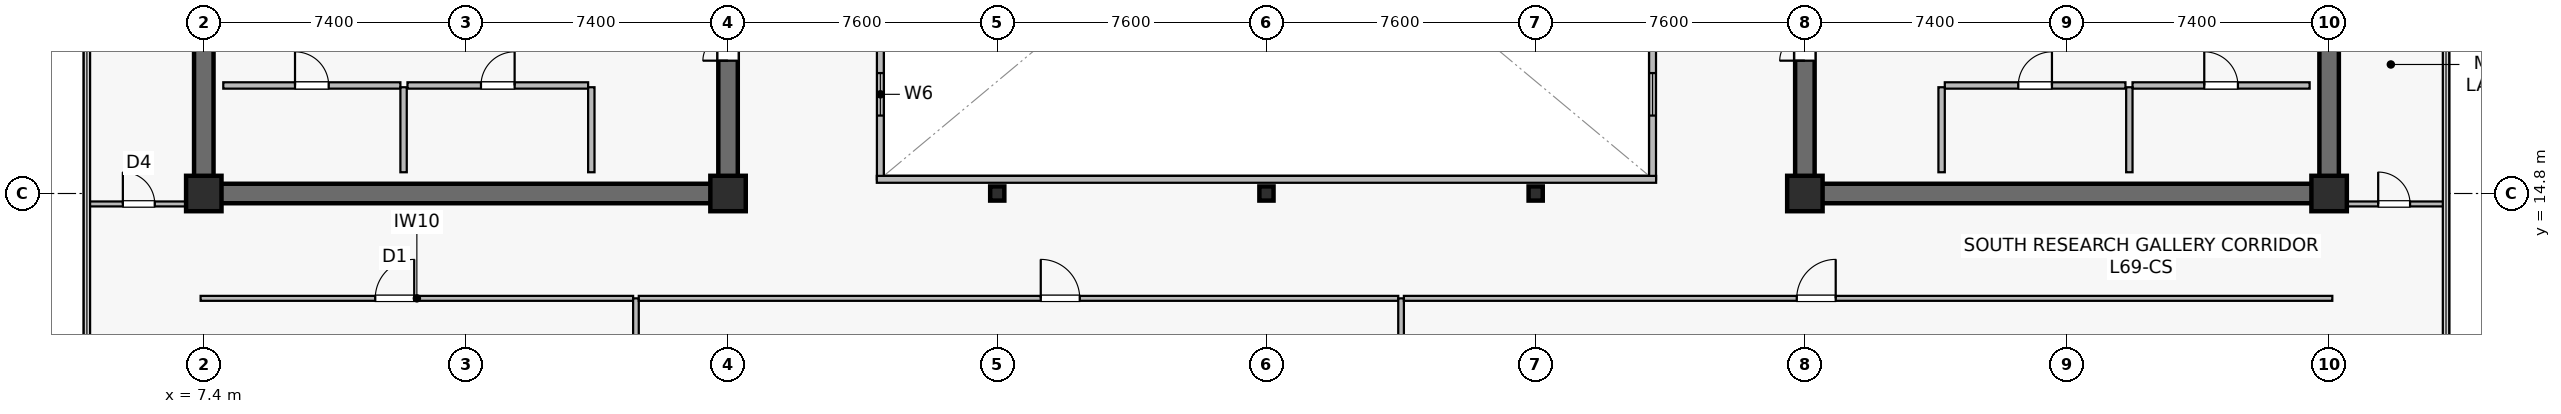
"""IFC4 building model, lengths in metres.
Left out: names, types, materials, properties, quantities, classifications, styles, units other than length and angle.
Written with IfcOpenShell. Run it as: python <this file> out.ifc"""

import sys

from ifc_helpers import new_model, si_unit, direction, frame, frame_2d, origin, origin_2d, place, context, subcontext, project, spatial, rectangle, hollow_rectangle, extrude, source, transform, mapped, element, fill, save


model = new_model("IFC4")
c1 = context("Model", 3, precision=1e-05, world=origin(), true_north=direction((0.0, 1.0)))
c2 = subcontext(c1, "Body", "Model", "MODEL_VIEW")
j1 = project(units=[si_unit("LENGTHUNIT", "METRE"), si_unit("PLANEANGLEUNIT", "RADIAN")], contexts=[c1])
p1 = place(None, origin())
s1 = spatial("IfcSite", under=j1, at=p1, CompositionType="ELEMENT")
p2 = place(p1, origin())
s2 = spatial("IfcBuilding", under=s1, at=p2, CompositionType="ELEMENT")
p3 = place(p2, frame((0.0, 0.0, 287.5)))
s3 = spatial("IfcBuildingStorey", under=s2, at=p3, CompositionType="ELEMENT", Elevation=287.5)
p4 = place(p3, frame((7.125, 14.8, 0.0), z_axis=(0.0, 0.0, 1.0), x_axis=(1.0, 0.0, 0.0)))
e1 = element("IfcWall", 1, at=p4, inside=s3, PredefinedType="SHEAR", context=c2, shape_type="SweptSolid", body=[
    extrude(rectangle(XDim=15.35, YDim=0.55, at=frame_2d((7.675, 0.0))), origin(), (0.0, 0.0, 1.0), 3.8),
])
p5 = place(p3, frame((7.4, 15.075, 0.0), z_axis=(0.0, 0.0, 1.0), x_axis=(0.0, 1.0, 0.0)))
e2 = element("IfcWall", 2, at=p5, inside=s3, PredefinedType="SHEAR", context=c2, shape_type="SweptSolid", body=[
    extrude(rectangle(XDim=18.45, YDim=0.55, at=frame_2d((9.225, 0.0))), origin(), (0.0, 0.0, 1.0), 3.8),
])
p6 = place(p3, frame((22.2, 15.075, 0.0), z_axis=(0.0, 0.0, 1.0), x_axis=(0.0, 1.0, 0.0)))
e3 = element("IfcWall", 3, at=p6, inside=s3, PredefinedType="SHEAR", context=c2, shape_type="SweptSolid", body=[
    extrude(rectangle(XDim=18.45, YDim=0.55, at=frame_2d((9.225, 0.0))), origin(), (0.0, 0.0, 1.0), 3.8),
])
p7 = place(p6, frame((3.475, 0.0, 0.0)))
e4 = element("IfcOpeningElement", 4, at=p7, cuts=e3, PredefinedType="OPENING", context=c2, shape_type="SweptSolid", body=[
    extrude(rectangle(XDim=1.42, YDim=2.2, at=frame_2d((0.71, 1.1))), frame((0.0, 0.285, 0.0), z_axis=(0.0, -1.0, 0.0), x_axis=(1.0, 0.0, 0.0)), (0.0, 0.0, 1.0), 0.57),
])
p8 = place(p3, frame((52.325, 14.8, 0.0), z_axis=(0.0, 0.0, 1.0), x_axis=(1.0, 0.0, 0.0)))
e5 = element("IfcWall", 5, at=p8, inside=s3, PredefinedType="SHEAR", context=c2, shape_type="SweptSolid", body=[
    extrude(rectangle(XDim=15.35, YDim=0.55, at=frame_2d((7.675, 0.0))), origin(), (0.0, 0.0, 1.0), 3.8),
])
p9 = place(p3, frame((52.6, 15.075, 0.0), z_axis=(0.0, 0.0, 1.0), x_axis=(0.0, 1.0, 0.0)))
e6 = element("IfcWall", 6, at=p9, inside=s3, PredefinedType="SHEAR", context=c2, shape_type="SweptSolid", body=[
    extrude(rectangle(XDim=18.45, YDim=0.55, at=frame_2d((9.225, 0.0))), origin(), (0.0, 0.0, 1.0), 3.8),
])
p10 = place(p9, frame((3.475, 0.0, 0.0)))
e7 = element("IfcOpeningElement", 7, at=p10, cuts=e6, PredefinedType="OPENING", context=c2, shape_type="SweptSolid", body=[
    extrude(rectangle(XDim=1.42, YDim=2.2, at=frame_2d((0.71, 1.1))), frame((0.0, 0.285, 0.0), z_axis=(0.0, -1.0, 0.0), x_axis=(1.0, 0.0, 0.0)), (0.0, 0.0, 1.0), 0.57),
])
p11 = place(p3, frame((67.4, 15.075, 0.0), z_axis=(0.0, 0.0, 1.0), x_axis=(0.0, 1.0, 0.0)))
e8 = element("IfcWall", 8, at=p11, inside=s3, PredefinedType="SHEAR", context=c2, shape_type="SweptSolid", body=[
    extrude(rectangle(XDim=18.45, YDim=0.55, at=frame_2d((9.225, 0.0))), origin(), (0.0, 0.0, 1.0), 3.8),
])
m1 = source(origin(), c2, "Body", "SweptSolid", [
    extrude(rectangle(XDim=1.0, YDim=1.0, at=origin_2d()), origin(), (0.0, 0.0, 1.0), 4.1),
])
for number, where, z_axis, x_axis in (
    (9, (7.4, 14.8, 0.0), (0.0, 0.0, 1.0), (1.0, 0.0, 0.0)),
    (10, (22.2, 14.8, 0.0), (0.0, 0.0, 1.0), (1.0, 0.0, 0.0)),
    (11, (52.6, 14.8, 0.0), (0.0, 0.0, 1.0), (1.0, 0.0, 0.0)),
    (12, (67.4, 14.8, 0.0), (0.0, 0.0, 1.0), (1.0, 0.0, 0.0)),
):
    element("IfcColumn", number, at=place(p3, frame(where, z_axis=z_axis, x_axis=x_axis)), inside=s3, PredefinedType="COLUMN", context=c2, shape_type="MappedRepresentation", body=[
        mapped(m1, transform((0.0, 0.0, 0.0), scale=1.0)),
    ])
m2 = source(origin(), c2, "Body", "SweptSolid", [
    extrude(hollow_rectangle(XDim=0.4, YDim=0.4, WallThickness=0.019, at=origin_2d()), origin(), (0.0, 0.0, 1.0), 4.1),
])
for number, where, z_axis, x_axis in (
    (13, (29.8, 14.8, 0.0), (0.0, 0.0, 1.0), (1.0, 0.0, 0.0)),
    (14, (37.4, 14.8, 0.0), (0.0, 0.0, 1.0), (1.0, 0.0, 0.0)),
    (15, (45.0, 14.8, 0.0), (0.0, 0.0, 1.0), (1.0, 0.0, 0.0)),
):
    element("IfcColumn", number, at=place(p3, frame(where, z_axis=z_axis, x_axis=x_axis)), inside=s3, PredefinedType="COLUMN", context=c2, shape_type="MappedRepresentation", body=[
        mapped(m2, transform((0.0, 0.0, 0.0), scale=1.0)),
    ])
p12 = place(p3, frame((7.95, 17.85, 0.0), z_axis=(0.0, 0.0, 1.0), x_axis=(1.0, 0.0, 0.0)))
e16 = element("IfcWall", 16, at=p12, inside=s3, PredefinedType="SOLIDWALL", context=c2, shape_type="SweptSolid", body=[
    extrude(rectangle(XDim=5.0, YDim=0.18, at=frame_2d((2.5, 0.0))), origin(), (0.0, 0.0, 1.0), 3.8),
])
p13 = place(p12, frame((2.025, 0.0, 0.0)))
e17 = element("IfcOpeningElement", 17, at=p13, cuts=e16, PredefinedType="OPENING", context=c2, shape_type="SweptSolid", body=[
    extrude(rectangle(XDim=0.95, YDim=2.15, at=frame_2d((0.475, 1.075))), frame((0.0, 0.1, 0.0), z_axis=(0.0, -1.0, 0.0), x_axis=(1.0, 0.0, 0.0)), (0.0, 0.0, 1.0), 0.2),
])
p14 = place(p3, frame((13.04, 15.4, 0.0), z_axis=(0.0, 0.0, 1.0), x_axis=(0.0, 1.0, 0.0)))
e18 = element("IfcWall", 18, at=p14, inside=s3, PredefinedType="SOLIDWALL", context=c2, shape_type="SweptSolid", body=[
    extrude(rectangle(XDim=2.4, YDim=0.18, at=frame_2d((1.2, 0.0))), origin(), (0.0, 0.0, 1.0), 3.8),
])
p15 = place(p3, frame((13.15, 17.85, 0.0), z_axis=(0.0, 0.0, 1.0), x_axis=(1.0, 0.0, 0.0)))
e19 = element("IfcWall", 19, at=p15, inside=s3, PredefinedType="SOLIDWALL", context=c2, shape_type="SweptSolid", body=[
    extrude(rectangle(XDim=5.1, YDim=0.18, at=frame_2d((2.55, 0.0))), origin(), (0.0, 0.0, 1.0), 3.197),
])
p16 = place(p15, frame((2.075, 0.0, 0.0)))
e20 = element("IfcOpeningElement", 20, at=p16, cuts=e19, PredefinedType="OPENING", context=c2, shape_type="SweptSolid", body=[
    extrude(rectangle(XDim=0.95, YDim=2.15, at=frame_2d((0.475, 1.075))), frame((0.0, 0.1, 0.0), z_axis=(0.0, -1.0, 0.0), x_axis=(1.0, 0.0, 0.0)), (0.0, 0.0, 1.0), 0.2),
])
p17 = place(p3, frame((18.34, 15.4, 0.0), z_axis=(0.0, 0.0, 1.0), x_axis=(0.0, 1.0, 0.0)))
e21 = element("IfcWall", 21, at=p17, inside=s3, PredefinedType="SOLIDWALL", context=c2, shape_type="SweptSolid", body=[
    extrude(rectangle(XDim=2.4, YDim=0.18, at=frame_2d((1.2, 0.0))), origin(), (0.0, 0.0, 1.0), 3.8),
])
p18 = place(p3, frame((61.85, 17.85, 0.0), z_axis=(0.0, 0.0, 1.0), x_axis=(1.0, 0.0, 0.0)))
e22 = element("IfcWall", 22, at=p18, inside=s3, PredefinedType="SOLIDWALL", context=c2, shape_type="SweptSolid", body=[
    extrude(rectangle(XDim=5.0, YDim=0.18, at=frame_2d((2.5, 0.0))), origin(), (0.0, 0.0, 1.0), 3.8),
])
p19 = place(p18, frame((2.025, 0.0, 0.0)))
e23 = element("IfcOpeningElement", 23, at=p19, cuts=e22, PredefinedType="OPENING", context=c2, shape_type="SweptSolid", body=[
    extrude(rectangle(XDim=0.95, YDim=2.15, at=frame_2d((0.475, 1.075))), frame((0.0, 0.1, 0.0), z_axis=(0.0, -1.0, 0.0), x_axis=(1.0, 0.0, 0.0)), (0.0, 0.0, 1.0), 0.2),
])
p20 = place(p3, frame((61.76, 15.4, 0.0), z_axis=(0.0, 0.0, 1.0), x_axis=(0.0, 1.0, 0.0)))
e24 = element("IfcWall", 24, at=p20, inside=s3, PredefinedType="SOLIDWALL", context=c2, shape_type="SweptSolid", body=[
    extrude(rectangle(XDim=2.4, YDim=0.18, at=frame_2d((1.2, 0.0))), origin(), (0.0, 0.0, 1.0), 3.8),
])
p21 = place(p3, frame((56.55, 17.85, 0.0), z_axis=(0.0, 0.0, 1.0), x_axis=(1.0, 0.0, 0.0)))
e25 = element("IfcWall", 25, at=p21, inside=s3, PredefinedType="SOLIDWALL", context=c2, shape_type="SweptSolid", body=[
    extrude(rectangle(XDim=5.1, YDim=0.18, at=frame_2d((2.55, 0.0))), origin(), (0.0, 0.0, 1.0), 3.197),
])
p22 = place(p21, frame((2.075, 0.0, 0.0)))
e26 = element("IfcOpeningElement", 26, at=p22, cuts=e25, PredefinedType="OPENING", context=c2, shape_type="SweptSolid", body=[
    extrude(rectangle(XDim=0.95, YDim=2.15, at=frame_2d((0.475, 1.075))), frame((0.0, 0.1, 0.0), z_axis=(0.0, -1.0, 0.0), x_axis=(1.0, 0.0, 0.0)), (0.0, 0.0, 1.0), 0.2),
])
p23 = place(p3, frame((56.46, 15.4, 0.0), z_axis=(0.0, 0.0, 1.0), x_axis=(0.0, 1.0, 0.0)))
e27 = element("IfcWall", 27, at=p23, inside=s3, PredefinedType="SOLIDWALL", context=c2, shape_type="SweptSolid", body=[
    extrude(rectangle(XDim=2.4, YDim=0.18, at=frame_2d((1.2, 0.0))), origin(), (0.0, 0.0, 1.0), 3.8),
])
p24 = place(p3, frame((26.5, 15.2, 0.0), z_axis=(0.0, 0.0, 1.0), x_axis=(0.0, 1.0, 0.0)))
e28 = element("IfcWall", 28, at=p24, inside=s3, PredefinedType="SOLIDWALL", context=c2, shape_type="SweptSolid", body=[
    extrude(rectangle(XDim=18.2, YDim=0.195, at=frame_2d((9.1, 0.0))), origin(), (0.0, 0.0, 1.0), 3.8),
])
p25 = place(p24, frame((1.8, 0.0, 0.9)))
e29 = element("IfcOpeningElement", 29, at=p25, cuts=e28, PredefinedType="OPENING", context=c2, shape_type="SweptSolid", body=[
    extrude(rectangle(XDim=1.2, YDim=1.35, at=frame_2d((0.6, 0.675))), frame((0.0, 0.107, 0.0), z_axis=(0.0, -1.0, 0.0), x_axis=(1.0, 0.0, 0.0)), (0.0, 0.0, 1.0), 0.215),
])
p26 = place(p24, frame((13.2, 0.0, 0.9)))
e30 = element("IfcOpeningElement", 30, at=p26, cuts=e28, PredefinedType="OPENING", context=c2, shape_type="SweptSolid", body=[
    extrude(rectangle(XDim=1.2, YDim=1.35, at=frame_2d((0.6, 0.675))), frame((0.0, 0.107, 0.0), z_axis=(0.0, -1.0, 0.0), x_axis=(1.0, 0.0, 0.0)), (0.0, 0.0, 1.0), 0.215),
])
p27 = place(p3, frame((48.3, 15.2, 0.0), z_axis=(0.0, 0.0, 1.0), x_axis=(0.0, 1.0, 0.0)))
e31 = element("IfcWall", 31, at=p27, inside=s3, PredefinedType="SOLIDWALL", context=c2, shape_type="SweptSolid", body=[
    extrude(rectangle(XDim=18.2, YDim=0.195, at=frame_2d((9.1, 0.0))), origin(), (0.0, 0.0, 1.0), 3.8),
])
p28 = place(p27, frame((1.8, 0.0, 0.9)))
e32 = element("IfcOpeningElement", 32, at=p28, cuts=e31, PredefinedType="OPENING", context=c2, shape_type="SweptSolid", body=[
    extrude(rectangle(XDim=1.2, YDim=1.35, at=frame_2d((0.6, 0.675))), frame((0.0, 0.107, 0.0), z_axis=(0.0, -1.0, 0.0), x_axis=(1.0, 0.0, 0.0)), (0.0, 0.0, 1.0), 0.215),
])
p29 = place(p27, frame((13.2, 0.0, 0.9)))
e33 = element("IfcOpeningElement", 33, at=p29, cuts=e31, PredefinedType="OPENING", context=c2, shape_type="SweptSolid", body=[
    extrude(rectangle(XDim=1.2, YDim=1.35, at=frame_2d((0.6, 0.675))), frame((0.0, 0.107, 0.0), z_axis=(0.0, -1.0, 0.0), x_axis=(1.0, 0.0, 0.0)), (0.0, 0.0, 1.0), 0.215),
])
p30 = place(p3, frame((26.4, 15.2, 0.0), z_axis=(0.0, 0.0, 1.0), x_axis=(1.0, 0.0, 0.0)))
e34 = element("IfcWall", 34, at=p30, inside=s3, PredefinedType="SOLIDWALL", context=c2, shape_type="SweptSolid", body=[
    extrude(rectangle(XDim=22.0, YDim=0.195, at=frame_2d((11.0, 0.0))), origin(), (0.0, 0.0, 1.0), 3.8),
])
p31 = place(p3, frame((7.31, 11.84, 0.0), z_axis=(0.0, 0.0, 1.0), x_axis=(1.0, 0.0, 0.0)))
e35 = element("IfcWall", 35, at=p31, inside=s3, PredefinedType="PARTITIONING", context=c2, shape_type="SweptSolid", body=[
    extrude(rectangle(XDim=12.21, YDim=0.14, at=frame_2d((6.105, 0.0))), origin(), (0.0, 0.0, 1.0), 3.197),
])
p32 = place(p31, frame((4.93, 0.0, 0.0)))
e36 = element("IfcOpeningElement", 36, at=p32, cuts=e35, PredefinedType="OPENING", context=c2, shape_type="SweptSolid", body=[
    extrude(rectangle(XDim=1.1, YDim=2.18, at=frame_2d((0.55, 1.09))), frame((0.0, 0.08, 0.0), z_axis=(0.0, -1.0, 0.0), x_axis=(1.0, 0.0, 0.0)), (0.0, 0.0, 1.0), 0.16),
])
p33 = place(p3, frame((19.6, 2.71, 0.0), z_axis=(0.0, 0.0, 1.0), x_axis=(0.0, 1.0, 0.0)))
e37 = element("IfcWall", 37, at=p33, inside=s3, PredefinedType="PARTITIONING", context=c2, shape_type="SweptSolid", body=[
    extrude(rectangle(XDim=9.13, YDim=0.16, at=frame_2d((4.565, 0.0))), origin(), (0.0, 0.0, 1.0), 3.135),
])
p34 = place(p3, frame((19.68, 11.84, 0.0), z_axis=(0.0, 0.0, 1.0), x_axis=(1.0, 0.0, 0.0)))
e38 = element("IfcWall", 38, at=p34, inside=s3, PredefinedType="PARTITIONING", context=c2, shape_type="SweptSolid", body=[
    extrude(rectangle(XDim=21.44, YDim=0.14, at=frame_2d((10.72, 0.0))), origin(), (0.0, 0.0, 1.0), 3.197),
])
p35 = place(p34, frame((11.348, 0.0, 0.0)))
e39 = element("IfcOpeningElement", 39, at=p35, cuts=e38, PredefinedType="OPENING", context=c2, shape_type="SweptSolid", body=[
    extrude(rectangle(XDim=1.1, YDim=2.18, at=frame_2d((0.55, 1.09))), frame((0.0, 0.08, 0.0), z_axis=(0.0, -1.0, 0.0), x_axis=(1.0, 0.0, 0.0)), (0.0, 0.0, 1.0), 0.16),
])
p36 = place(p3, frame((41.2, 3.91, 0.0), z_axis=(0.0, 0.0, 1.0), x_axis=(0.0, 1.0, 0.0)))
e40 = element("IfcWall", 40, at=p36, inside=s3, PredefinedType="PARTITIONING", context=c2, shape_type="SweptSolid", body=[
    extrude(rectangle(XDim=7.93, YDim=0.16, at=frame_2d((3.965, 0.0))), origin(), (0.0, 0.0, 1.0), 3.135),
])
p37 = place(p3, frame((41.28, 11.84, 0.0), z_axis=(0.0, 0.0, 1.0), x_axis=(1.0, 0.0, 0.0)))
e41 = element("IfcWall", 41, at=p37, inside=s3, PredefinedType="PARTITIONING", context=c2, shape_type="SweptSolid", body=[
    extrude(rectangle(XDim=26.21, YDim=0.14, at=frame_2d((13.105, 0.0))), origin(), (0.0, 0.0, 1.0), 3.197),
])
p38 = place(p37, frame((11.09, 0.0, 0.0)))
e42 = element("IfcOpeningElement", 42, at=p38, cuts=e41, PredefinedType="OPENING", context=c2, shape_type="SweptSolid", body=[
    extrude(rectangle(XDim=1.1, YDim=2.18, at=frame_2d((0.55, 1.09))), frame((0.0, 0.08, 0.0), z_axis=(0.0, -1.0, 0.0), x_axis=(1.0, 0.0, 0.0)), (0.0, 0.0, 1.0), 0.16),
])
p39 = place(p3, frame((4.11, 14.505, 0.0), z_axis=(0.0, 0.0, 1.0), x_axis=(1.0, 0.0, 0.0)))
e43 = element("IfcWall", 43, at=p39, inside=s3, PredefinedType="PARTITIONING", context=c2, shape_type="SweptSolid", body=[
    extrude(rectangle(XDim=2.91, YDim=0.14, at=frame_2d((1.455, 0.0))), origin(), (0.0, 0.0, 1.0), 3.8),
])
p40 = place(p39, frame((1.005, 0.0, 0.0)))
e44 = element("IfcOpeningElement", 44, at=p40, cuts=e43, PredefinedType="OPENING", context=c2, shape_type="SweptSolid", body=[
    extrude(rectangle(XDim=0.9, YDim=2.1, at=frame_2d((0.45, 1.05))), frame((0.0, 0.08, 0.0), z_axis=(0.0, -1.0, 0.0), x_axis=(1.0, 0.0, 0.0)), (0.0, 0.0, 1.0), 0.16),
])
p41 = place(p3, frame((67.78, 14.505, 0.0), z_axis=(0.0, 0.0, 1.0), x_axis=(1.0, 0.0, 0.0)))
e45 = element("IfcWall", 45, at=p41, inside=s3, PredefinedType="PARTITIONING", context=c2, shape_type="SweptSolid", body=[
    extrude(rectangle(XDim=2.91, YDim=0.14, at=frame_2d((1.455, 0.0))), origin(), (0.0, 0.0, 1.0), 3.8),
])
p42 = place(p41, frame((1.005, 0.0, 0.0)))
e46 = element("IfcOpeningElement", 46, at=p42, cuts=e45, PredefinedType="OPENING", context=c2, shape_type="SweptSolid", body=[
    extrude(rectangle(XDim=0.9, YDim=2.1, at=frame_2d((0.45, 1.05))), frame((0.0, 0.08, 0.0), z_axis=(0.0, -1.0, 0.0), x_axis=(1.0, 0.0, 0.0)), (0.0, 0.0, 1.0), 0.16),
])
m3 = source(origin(), c2, "Body", "SweptSolid", [
    extrude(rectangle(XDim=1.2, YDim=1.35, at=frame_2d((0.6, 0.675))), frame((0.0, 0.03, 0.0), z_axis=(0.0, -1.0, 0.0), x_axis=(1.0, 0.0, 0.0)), (0.0, 0.0, 1.0), 0.06),
])
p43 = place(p25, origin())
e47 = element("IfcWindow", 47, at=p43, inside=s3, PartitioningType="SINGLE_PANEL", PredefinedType="WINDOW", context=c2, shape_type="MappedRepresentation", body=[
    mapped(m3, transform((0.0, 0.0, 0.0), scale=1.0)),
])
fill(e29, e47)
p44 = place(p28, origin())
e48 = element("IfcWindow", 48, at=p44, inside=s3, PartitioningType="SINGLE_PANEL", PredefinedType="WINDOW", context=c2, shape_type="MappedRepresentation", body=[
    mapped(m3, transform((0.0, 0.0, 0.0), scale=1.0)),
])
fill(e32, e48)
m4 = source(origin(), c2, "Body", "SweptSolid", [
    extrude(rectangle(XDim=0.95, YDim=2.15, at=frame_2d((0.475, 1.075))), frame((0.0, 0.025, 0.0), z_axis=(0.0, -1.0, 0.0), x_axis=(1.0, 0.0, 0.0)), (0.0, 0.0, 1.0), 0.05),
])
p45 = place(p13, origin())
e49 = element("IfcDoor", 49, at=p45, inside=s3, OperationType="SINGLE_SWING_LEFT", PredefinedType="DOOR", context=c2, shape_type="MappedRepresentation", body=[
    mapped(m4, transform((0.0, 0.0, 0.0), scale=1.0)),
])
fill(e17, e49)
p46 = place(p16, origin())
e50 = element("IfcDoor", 50, at=p46, inside=s3, OperationType="SINGLE_SWING_RIGHT", PredefinedType="DOOR", context=c2, shape_type="MappedRepresentation", body=[
    mapped(m4, transform((0.0, 0.0, 0.0), scale=1.0)),
])
fill(e20, e50)
m5 = source(origin(), c2, "Body", "SweptSolid", [
    extrude(rectangle(XDim=1.42, YDim=2.2, at=frame_2d((0.71, 1.1))), frame((0.0, 0.025, 0.0), z_axis=(0.0, -1.0, 0.0), x_axis=(1.0, 0.0, 0.0)), (0.0, 0.0, 1.0), 0.05),
])
p47 = place(p7, origin())
e51 = element("IfcDoor", 51, at=p47, inside=s3, OperationType="DOUBLE_DOOR_SINGLE_SWING", PredefinedType="DOOR", context=c2, shape_type="MappedRepresentation", body=[
    mapped(m5, transform((0.0, 0.0, 0.0), scale=1.0)),
])
fill(e4, e51)
p48 = place(p19, origin())
e52 = element("IfcDoor", 52, at=p48, inside=s3, OperationType="SINGLE_SWING_LEFT", PredefinedType="DOOR", context=c2, shape_type="MappedRepresentation", body=[
    mapped(m4, transform((0.0, 0.0, 0.0), scale=1.0)),
])
fill(e23, e52)
p49 = place(p22, origin())
e53 = element("IfcDoor", 53, at=p49, inside=s3, OperationType="SINGLE_SWING_RIGHT", PredefinedType="DOOR", context=c2, shape_type="MappedRepresentation", body=[
    mapped(m4, transform((0.0, 0.0, 0.0), scale=1.0)),
])
fill(e26, e53)
p50 = place(p10, origin())
e54 = element("IfcDoor", 54, at=p50, inside=s3, OperationType="DOUBLE_DOOR_SINGLE_SWING", PredefinedType="DOOR", context=c2, shape_type="MappedRepresentation", body=[
    mapped(m5, transform((0.0, 0.0, 0.0), scale=1.0)),
])
fill(e7, e54)
m6 = source(origin(), c2, "Body", "SweptSolid", [
    extrude(rectangle(XDim=1.1, YDim=2.18, at=frame_2d((0.55, 1.09))), frame((0.0, 0.025, 0.0), z_axis=(0.0, -1.0, 0.0), x_axis=(1.0, 0.0, 0.0)), (0.0, 0.0, 1.0), 0.05),
])
p51 = place(p32, origin())
e55 = element("IfcDoor", 55, at=p51, inside=s3, OperationType="SINGLE_SWING_RIGHT", PredefinedType="DOOR", context=c2, shape_type="MappedRepresentation", body=[
    mapped(m6, transform((0.0, 0.0, 0.0), scale=1.0)),
])
fill(e36, e55)
p52 = place(p35, origin())
e56 = element("IfcDoor", 56, at=p52, inside=s3, OperationType="SINGLE_SWING_LEFT", PredefinedType="DOOR", context=c2, shape_type="MappedRepresentation", body=[
    mapped(m6, transform((0.0, 0.0, 0.0), scale=1.0)),
])
fill(e39, e56)
p53 = place(p38, origin())
e57 = element("IfcDoor", 57, at=p53, inside=s3, OperationType="SINGLE_SWING_RIGHT", PredefinedType="DOOR", context=c2, shape_type="MappedRepresentation", body=[
    mapped(m6, transform((0.0, 0.0, 0.0), scale=1.0)),
])
fill(e42, e57)
m7 = source(origin(), c2, "Body", "SweptSolid", [
    extrude(rectangle(XDim=0.9, YDim=2.1, at=frame_2d((0.45, 1.05))), frame((0.0, 0.025, 0.0), z_axis=(0.0, -1.0, 0.0), x_axis=(1.0, 0.0, 0.0)), (0.0, 0.0, 1.0), 0.05),
])
p54 = place(p40, origin())
e58 = element("IfcDoor", 58, at=p54, inside=s3, OperationType="SINGLE_SWING_LEFT", PredefinedType="DOOR", context=c2, shape_type="MappedRepresentation", body=[
    mapped(m7, transform((0.0, 0.0, 0.0), scale=1.0)),
])
fill(e44, e58)
p55 = place(p42, origin())
e59 = element("IfcDoor", 59, at=p55, inside=s3, OperationType="SINGLE_SWING_LEFT", PredefinedType="DOOR", context=c2, shape_type="MappedRepresentation", body=[
    mapped(m7, transform((0.0, 0.0, 0.0), scale=1.0)),
])
fill(e46, e59)
save(model, sys.argv[1])
